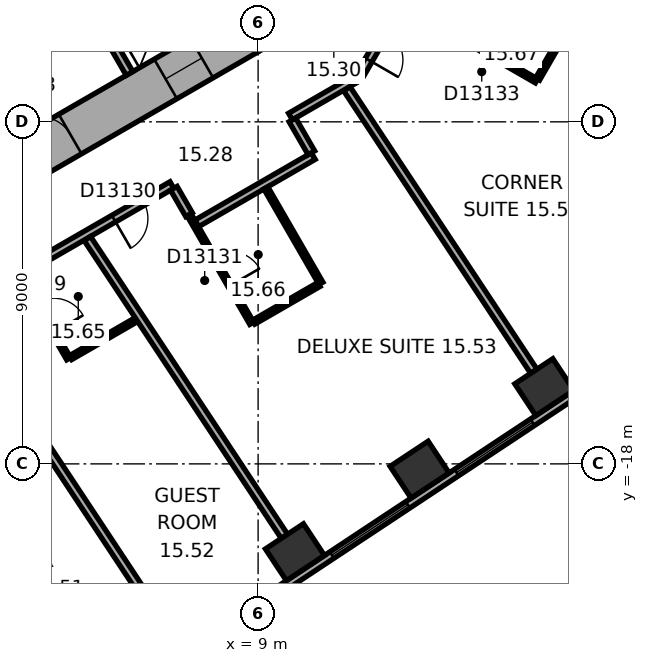
"""IFC4 building model, lengths in metres.
Left out: names, types, materials, properties, quantities, classifications, styles, units other than length and angle.
Written with IfcOpenShell. Run it as: python <this file> out.ifc"""

import sys

from ifc_helpers import new_model, si_unit, direction, frame, frame_2d, origin, origin_2d, place, context, subcontext, project, spatial, rectangle, extrude, element, fill, save


model = new_model("IFC4")
c1 = context("Model", 3, precision=1e-05, world=origin(), true_north=direction((0.0, 1.0)))
c2 = subcontext(c1, "Body", "Model", "MODEL_VIEW")
j1 = project(units=[si_unit("LENGTHUNIT", "METRE"), si_unit("PLANEANGLEUNIT", "RADIAN")], contexts=[c1])
p1 = place(None, origin())
s1 = spatial("IfcSite", under=j1, at=p1, CompositionType="ELEMENT")
p2 = place(p1, origin())
s2 = spatial("IfcBuilding", under=s1, at=p2, CompositionType="ELEMENT")
p3 = place(p2, frame((0.0, 0.0, 70.4)))
s3 = spatial("IfcBuildingStorey", under=s2, at=p3, CompositionType="ELEMENT", Elevation=70.4)
for number, where, z_axis, x_axis in (
    (1, (9.969, -20.324, 0.0), (0.0, 0.0, 1.0), (0.834, 0.552, 0.0)),
    (2, (13.25, -18.152, 0.0), (0.0, 0.0, 1.0), (0.834, 0.552, 0.0)),
    (3, (16.531, -15.981, 0.0), (0.0, 0.0, 1.0), (0.834, 0.552, 0.0)),
):
    element("IfcColumn", number, at=place(p3, frame(where, z_axis=z_axis, x_axis=x_axis)), inside=s3, PredefinedType="COLUMN", context=c2, shape_type="SweptSolid", body=[
        extrude(rectangle(XDim=1.2, YDim=1.0, at=origin_2d()), origin(), (0.0, 0.0, 1.0), 3.3),
    ])
p4 = place(p3, frame((-0.3, -11.836, 0.0), z_axis=(0.0, 0.0, 1.0), x_axis=(0.866021384402, 0.500006961711, 0.0)))
e4 = element("IfcWall", 4, at=p4, inside=s3, PredefinedType="SHEAR", context=c2, shape_type="SweptSolid", body=[
    extrude(rectangle(XDim=12.355, YDim=1.2, at=frame_2d((6.178, 0.0))), origin(), (0.0, 0.0, 1.0), 3.3),
])
p5 = place(p4, frame((4.128, 0.0, 0.0)))
e5 = element("IfcOpeningElement", 5, at=p5, cuts=e4, PredefinedType="OPENING", context=c2, shape_type="SweptSolid", body=[
    extrude(rectangle(XDim=0.9, YDim=2.1, at=frame_2d((0.45, 1.05))), frame((0.0, 0.61, 0.0), z_axis=(0.0, -1.0, 0.0), x_axis=(1.0, 0.0, 0.0)), (0.0, 0.0, 1.0), 1.22),
])
p6 = place(p4, frame((7.928, 0.0, 0.0)))
e6 = element("IfcOpeningElement", 6, at=p6, cuts=e4, PredefinedType="OPENING", context=c2, shape_type="SweptSolid", body=[
    extrude(rectangle(XDim=1.1, YDim=2.1, at=frame_2d((0.55, 1.05))), frame((0.0, 0.61, 0.0), z_axis=(0.0, -1.0, 0.0), x_axis=(1.0, 0.0, 0.0)), (0.0, 0.0, 1.0), 1.22),
])
p7 = place(p3, frame((3.083, -25.601, 0.0), z_axis=(0.0, 0.0, 1.0), x_axis=(0.833884295743, 0.551939291329, 0.0)))
e7 = element("IfcWall", 7, at=p7, inside=s3, PredefinedType="STANDARD", context=c2, shape_type="SweptSolid", body=[
    extrude(rectangle(XDim=21.246, YDim=0.2, at=frame_2d((10.623, 0.0))), origin(), (0.0, 0.0, 1.0), 3.3),
])
p8 = place(p7, frame((1.553, 0.0, 0.8)))
e8 = element("IfcOpeningElement", 8, at=p8, cuts=e7, PredefinedType="OPENING", context=c2, shape_type="SweptSolid", body=[
    extrude(rectangle(XDim=2.4, YDim=1.7, at=frame_2d((1.2, 0.85))), frame((0.0, 0.11, 0.0), z_axis=(0.0, -1.0, 0.0), x_axis=(1.0, 0.0, 0.0)), (0.0, 0.0, 1.0), 0.22),
])
p9 = place(p7, frame((5.488, 0.0, 0.8)))
e9 = element("IfcOpeningElement", 9, at=p9, cuts=e7, PredefinedType="OPENING", context=c2, shape_type="SweptSolid", body=[
    extrude(rectangle(XDim=2.4, YDim=1.7, at=frame_2d((1.2, 0.85))), frame((0.0, 0.11, 0.0), z_axis=(0.0, -1.0, 0.0), x_axis=(1.0, 0.0, 0.0)), (0.0, 0.0, 1.0), 0.22),
])
p10 = place(p7, frame((9.422, 0.0, 0.8)))
e10 = element("IfcOpeningElement", 10, at=p10, cuts=e7, PredefinedType="OPENING", context=c2, shape_type="SweptSolid", body=[
    extrude(rectangle(XDim=2.4, YDim=1.7, at=frame_2d((1.2, 0.85))), frame((0.0, 0.11, 0.0), z_axis=(0.0, -1.0, 0.0), x_axis=(1.0, 0.0, 0.0)), (0.0, 0.0, 1.0), 0.22),
])
p11 = place(p7, frame((13.357, 0.0, 0.8)))
e11 = element("IfcOpeningElement", 11, at=p11, cuts=e7, PredefinedType="OPENING", context=c2, shape_type="SweptSolid", body=[
    extrude(rectangle(XDim=2.4, YDim=1.7, at=frame_2d((1.2, 0.85))), frame((0.0, 0.11, 0.0), z_axis=(0.0, -1.0, 0.0), x_axis=(1.0, 0.0, 0.0)), (0.0, 0.0, 1.0), 0.22),
])
p12 = place(p7, frame((17.291, 0.0, 0.8)))
e12 = element("IfcOpeningElement", 12, at=p12, cuts=e7, PredefinedType="OPENING", context=c2, shape_type="SweptSolid", body=[
    extrude(rectangle(XDim=2.4, YDim=1.7, at=frame_2d((1.2, 0.85))), frame((0.0, 0.11, 0.0), z_axis=(0.0, -1.0, 0.0), x_axis=(1.0, 0.0, 0.0)), (0.0, 0.0, 1.0), 0.22),
])
p13 = place(p3, frame((-0.024, -8.559, 0.0), z_axis=(0.0, 0.0, 1.0), x_axis=(0.866026010844, 0.49999894854, 0.0)))
e13 = element("IfcWall", 13, at=p13, inside=s3, PredefinedType="PARTITIONING", context=c2, shape_type="SweptSolid", body=[
    extrude(rectangle(XDim=8.0, YDim=0.2, at=frame_2d((4.0, 0.0))), origin(), (0.0, 0.0, 1.0), 3.05),
])
p14 = place(p3, frame((4.516, -5.822, 0.0), z_axis=(0.0, 0.0, 1.0), x_axis=(0.499946605688, -0.86605622881, 0.0)))
e14 = element("IfcWall", 14, at=p14, inside=s3, PredefinedType="PARTITIONING", context=c2, shape_type="SweptSolid", body=[
    extrude(rectangle(XDim=2.2, YDim=0.2, at=frame_2d((1.1, 0.0))), origin(), (0.0, 0.0, 1.0), 3.05),
])
p15 = place(p3, frame((0.847, -7.767, 0.0), z_axis=(0.0, 0.0, 1.0), x_axis=(0.866027801685, 0.499995846692, 0.0)))
e15 = element("IfcWall", 15, at=p15, inside=s3, PredefinedType="SHEAR", context=c2, shape_type="SweptSolid", body=[
    extrude(rectangle(XDim=7.06, YDim=0.3, at=frame_2d((3.53, 0.0))), origin(), (0.0, 0.0, 1.0), 3.05),
])
p16 = place(p3, frame((1.033, -13.953, 0.0), z_axis=(0.0, 0.0, 1.0), x_axis=(0.866017531406, 0.500013635111, 0.0)))
e16 = element("IfcWall", 16, at=p16, inside=s3, PredefinedType="PARTITIONING", context=c2, shape_type="SweptSolid", body=[
    extrude(rectangle(XDim=6.58, YDim=0.2, at=frame_2d((3.29, 0.0))), origin(), (0.0, 0.0, 1.0), 3.05),
])
p17 = place(p16, frame((0.496, 0.0, 0.0)))
e17 = element("IfcOpeningElement", 17, at=p17, cuts=e16, PredefinedType="OPENING", context=c2, shape_type="SweptSolid", body=[
    extrude(rectangle(XDim=0.9, YDim=2.1, at=frame_2d((0.45, 1.05))), frame((0.0, 0.11, 0.0), z_axis=(0.0, -1.0, 0.0), x_axis=(1.0, 0.0, 0.0)), (0.0, 0.0, 1.0), 0.22),
])
p18 = place(p16, frame((4.811, 0.0, 0.0)))
e18 = element("IfcOpeningElement", 18, at=p18, cuts=e16, PredefinedType="OPENING", context=c2, shape_type="SweptSolid", body=[
    extrude(rectangle(XDim=0.9, YDim=2.1, at=frame_2d((0.45, 1.05))), frame((0.0, 0.11, 0.0), z_axis=(0.0, -1.0, 0.0), x_axis=(1.0, 0.0, 0.0)), (0.0, 0.0, 1.0), 0.22),
])
p19 = place(p3, frame((4.015, -15.233, 0.0), z_axis=(0.0, 0.0, 1.0), x_axis=(-0.499961950354, 0.866047370643, 0.0)))
e19 = element("IfcWall", 19, at=p19, inside=s3, PredefinedType="PARTITIONING", context=c2, shape_type="SweptSolid", body=[
    extrude(rectangle(XDim=2.5, YDim=0.12, at=frame_2d((1.25, 0.0))), origin(), (0.0, 0.0, 1.0), 3.05),
])
p20 = place(p19, frame((0.8, 0.0, 0.0)))
e20 = element("IfcOpeningElement", 20, at=p20, cuts=e19, PredefinedType="OPENING", context=c2, shape_type="SweptSolid", body=[
    extrude(rectangle(XDim=0.9, YDim=2.1, at=frame_2d((0.45, 1.05))), frame((0.0, 0.07, 0.0), z_axis=(0.0, -1.0, 0.0), x_axis=(1.0, 0.0, 0.0)), (0.0, 0.0, 1.0), 0.14),
])
p21 = place(p3, frame((5.798, -14.204, 0.0), z_axis=(0.0, 0.0, 1.0), x_axis=(-0.865972029493, -0.500092435591, 0.0)))
e21 = element("IfcWall", 21, at=p21, inside=s3, PredefinedType="PARTITIONING", context=c2, shape_type="SweptSolid", body=[
    extrude(rectangle(XDim=1.999, YDim=0.12, at=frame_2d((1.0, 0.0))), origin(), (0.0, 0.0, 1.0), 3.05),
])
p22 = place(p3, frame((6.412, -22.079, 0.0), z_axis=(0.0, 0.0, 1.0), x_axis=(-0.551919507115, 0.83389739037, 0.0)))
e22 = element("IfcWall", 22, at=p22, inside=s3, PredefinedType="PARTITIONING", context=c2, shape_type="SweptSolid", body=[
    extrude(rectangle(XDim=9.635, YDim=0.2, at=frame_2d((4.817, 0.0))), origin(), (0.0, 0.0, 1.0), 3.05),
])
p23 = place(p3, frame((6.782, -10.749, 0.0), z_axis=(0.0, 0.0, 1.0), x_axis=(0.500170954823, -0.865926680471, 0.0)))
e23 = element("IfcWall", 23, at=p23, inside=s3, PredefinedType="PARTITIONING", context=c2, shape_type="SweptSolid", body=[
    extrude(rectangle(XDim=0.801, YDim=0.2, at=frame_2d((0.4, 0.0))), origin(), (0.0, 0.0, 1.0), 3.05),
])
p24 = place(p3, frame((7.385, -11.673, 0.0), z_axis=(0.0, 0.0, 1.0), x_axis=(0.866037524642, 0.499979005472, 0.0)))
e24 = element("IfcWall", 24, at=p24, inside=s3, PredefinedType="PARTITIONING", context=c2, shape_type="SweptSolid", body=[
    extrude(rectangle(XDim=3.542, YDim=0.2, at=frame_2d((1.771, 0.0))), origin(), (0.0, 0.0, 1.0), 3.05),
])
p25 = place(p3, frame((8.833, -14.301, 0.0), z_axis=(0.0, 0.0, 1.0), x_axis=(-0.499936836718, 0.866061868051, 0.0)))
e25 = element("IfcWall", 25, at=p25, inside=s3, PredefinedType="PARTITIONING", context=c2, shape_type="SweptSolid", body=[
    extrude(rectangle(XDim=3.188, YDim=0.12, at=frame_2d((1.594, 0.0))), origin(), (0.0, 0.0, 1.0), 3.05),
])
p26 = place(p25, frame((1.144, 0.0, 0.0)))
e26 = element("IfcOpeningElement", 26, at=p26, cuts=e25, PredefinedType="OPENING", context=c2, shape_type="SweptSolid", body=[
    extrude(rectangle(XDim=0.9, YDim=2.1, at=frame_2d((0.45, 1.05))), frame((0.0, 0.07, 0.0), z_axis=(0.0, -1.0, 0.0), x_axis=(1.0, 0.0, 0.0)), (0.0, 0.0, 1.0), 0.14),
])
p27 = place(p3, frame((9.203, -10.738, 0.0), z_axis=(0.0, 0.0, 1.0), x_axis=(0.50005036918, -0.865996321171, 0.0)))
e27 = element("IfcWall", 27, at=p27, inside=s3, PredefinedType="PARTITIONING", context=c2, shape_type="SweptSolid", body=[
    extrude(rectangle(XDim=2.9, YDim=0.12, at=frame_2d((1.45, 0.0))), origin(), (0.0, 0.0, 1.0), 3.05),
])
p28 = place(p3, frame((9.693, -19.907, 0.0), z_axis=(0.0, 0.0, 1.0), x_axis=(-0.551938394837, 0.833884889121, 0.0)))
e28 = element("IfcWall", 28, at=p28, inside=s3, PredefinedType="PARTITIONING", context=c2, shape_type="SweptSolid", body=[
    extrude(rectangle(XDim=9.394, YDim=0.2, at=frame_2d((4.697, 0.0))), origin(), (0.0, 0.0, 1.0), 2.6),
])
p29 = place(p3, frame((9.852, -8.861, 0.0), z_axis=(0.0, 0.0, 1.0), x_axis=(0.866013291437, 0.500020978615, 0.0)))
e29 = element("IfcWall", 29, at=p29, inside=s3, PredefinedType="PARTITIONING", context=c2, shape_type="SweptSolid", body=[
    extrude(rectangle(XDim=2.077, YDim=0.2, at=frame_2d((1.038, 0.0))), origin(), (0.0, 0.0, 1.0), 3.05),
])
p30 = place(p3, frame((10.402, -9.815, 0.0), z_axis=(0.0, 0.0, 1.0), x_axis=(-0.499968756647, 0.866043441391, 0.0)))
e30 = element("IfcWall", 30, at=p30, inside=s3, PredefinedType="PARTITIONING", context=c2, shape_type="SweptSolid", body=[
    extrude(rectangle(XDim=1.001, YDim=0.2, at=frame_2d((0.5, 0.0))), origin(), (0.0, 0.0, 1.0), 3.05),
])
p31 = place(p3, frame((10.601, -13.28, 0.0), z_axis=(0.0, 0.0, 1.0), x_axis=(-0.866044057189, -0.499967689963, 0.0)))
e31 = element("IfcWall", 31, at=p31, inside=s3, PredefinedType="PARTITIONING", context=c2, shape_type="SweptSolid", body=[
    extrude(rectangle(XDim=1.982, YDim=0.12, at=frame_2d((0.991, 0.0))), origin(), (0.0, 0.0, 1.0), 3.05),
])
p32 = place(p3, frame((11.67, -7.788, 0.0), z_axis=(0.0, 0.0, 1.0), x_axis=(0.500063286585, 0.865988862174, 0.0)))
e32 = element("IfcWall", 32, at=p32, inside=s3, PredefinedType="PARTITIONING", context=c2, shape_type="SweptSolid", body=[
    extrude(rectangle(XDim=1.86, YDim=0.2, at=frame_2d((0.93, 0.0))), origin(), (0.0, 0.0, 1.0), 3.05),
])
p33 = place(p32, frame((0.48, 0.0, 0.0)))
e33 = element("IfcOpeningElement", 33, at=p33, cuts=e32, PredefinedType="OPENING", context=c2, shape_type="SweptSolid", body=[
    extrude(rectangle(XDim=0.9, YDim=2.1, at=frame_2d((0.45, 1.05))), frame((0.0, 0.11, 0.0), z_axis=(0.0, -1.0, 0.0), x_axis=(1.0, 0.0, 0.0)), (0.0, 0.0, 1.0), 0.22),
])
p34 = place(p3, frame((16.255, -15.564, 0.0), z_axis=(0.0, 0.0, 1.0), x_axis=(-0.55192208744, 0.833895682562, 0.0)))
e34 = element("IfcWall", 34, at=p34, inside=s3, PredefinedType="PARTITIONING", context=c2, shape_type="SweptSolid", body=[
    extrude(rectangle(XDim=8.913, YDim=0.2, at=frame_2d((4.457, 0.0))), origin(), (0.0, 0.0, 1.0), 2.6),
])
p35 = place(p3, frame((16.326, -7.925, 0.0), z_axis=(0.0, 0.0, 1.0), x_axis=(-0.865997131366, 0.500048966069, 0.0)))
e35 = element("IfcWall", 35, at=p35, inside=s3, PredefinedType="PARTITIONING", context=c2, shape_type="SweptSolid", body=[
    extrude(rectangle(XDim=2.74, YDim=0.12, at=frame_2d((1.37, 0.0))), origin(), (0.0, 0.0, 1.0), 3.05),
])
p36 = place(p35, frame((0.92, 0.0, 0.0)))
e36 = element("IfcOpeningElement", 36, at=p36, cuts=e35, PredefinedType="OPENING", context=c2, shape_type="SweptSolid", body=[
    extrude(rectangle(XDim=0.9, YDim=2.1, at=frame_2d((0.45, 1.05))), frame((0.0, 0.07, 0.0), z_axis=(0.0, -1.0, 0.0), x_axis=(1.0, 0.0, 0.0)), (0.0, 0.0, 1.0), 0.14),
])
p37 = place(p3, frame((17.396, -6.071, 0.0), z_axis=(0.0, 0.0, 1.0), x_axis=(-0.500027264788, -0.866009661879, 0.0)))
e37 = element("IfcWall", 37, at=p37, inside=s3, PredefinedType="PARTITIONING", context=c2, shape_type="SweptSolid", body=[
    extrude(rectangle(XDim=2.08, YDim=0.12, at=frame_2d((1.04, 0.0))), origin(), (0.0, 0.0, 1.0), 3.05),
])
p38 = place(p10, origin())
e38 = element("IfcWindow", 38, at=p38, inside=s3, PartitioningType="SINGLE_PANEL", PredefinedType="WINDOW", context=c2, shape_type="SweptSolid", body=[
    extrude(rectangle(XDim=2.4, YDim=1.7, at=frame_2d((1.2, 0.85))), frame((0.0, 0.03, 0.0), z_axis=(0.0, -1.0, 0.0), x_axis=(1.0, 0.0, 0.0)), (0.0, 0.0, 1.0), 0.06),
])
fill(e10, e38)
p39 = place(p11, origin())
e39 = element("IfcWindow", 39, at=p39, inside=s3, PartitioningType="SINGLE_PANEL", PredefinedType="WINDOW", context=c2, shape_type="SweptSolid", body=[
    extrude(rectangle(XDim=2.4, YDim=1.7, at=frame_2d((1.2, 0.85))), frame((0.0, 0.03, 0.0), z_axis=(0.0, -1.0, 0.0), x_axis=(1.0, 0.0, 0.0)), (0.0, 0.0, 1.0), 0.06),
])
fill(e11, e39)
p40 = place(p5, origin())
e40 = element("IfcDoor", 40, at=p40, inside=s3, OperationType="SINGLE_SWING_LEFT", PredefinedType="DOOR", context=c2, shape_type="SweptSolid", body=[
    extrude(rectangle(XDim=0.9, YDim=2.1, at=frame_2d((0.45, 1.05))), frame((0.0, 0.025, 0.0), z_axis=(0.0, -1.0, 0.0), x_axis=(1.0, 0.0, 0.0)), (0.0, 0.0, 1.0), 0.05),
])
fill(e5, e40)
p41 = place(p6, origin())
e41 = element("IfcDoor", 41, at=p41, inside=s3, OperationType="DOUBLE_DOOR_SLIDING", PredefinedType="DOOR", context=c2, shape_type="SweptSolid", body=[
    extrude(rectangle(XDim=1.1, YDim=2.1, at=frame_2d((0.55, 1.05))), frame((0.0, 0.025, 0.0), z_axis=(0.0, -1.0, 0.0), x_axis=(1.0, 0.0, 0.0)), (0.0, 0.0, 1.0), 0.05),
])
fill(e6, e41)
p42 = place(p20, origin())
e42 = element("IfcDoor", 42, at=p42, inside=s3, OperationType="SINGLE_SWING_LEFT", PredefinedType="DOOR", context=c2, shape_type="SweptSolid", body=[
    extrude(rectangle(XDim=0.9, YDim=2.1, at=frame_2d((0.45, 1.05))), frame((0.0, 0.025, 0.0), z_axis=(0.0, -1.0, 0.0), x_axis=(1.0, 0.0, 0.0)), (0.0, 0.0, 1.0), 0.05),
])
fill(e20, e42)
p43 = place(p18, origin())
e43 = element("IfcDoor", 43, at=p43, inside=s3, OperationType="SINGLE_SWING_LEFT", PredefinedType="DOOR", context=c2, shape_type="SweptSolid", body=[
    extrude(rectangle(XDim=0.9, YDim=2.1, at=frame_2d((0.45, 1.05))), frame((0.0, 0.025, 0.0), z_axis=(0.0, -1.0, 0.0), x_axis=(1.0, 0.0, 0.0)), (0.0, 0.0, 1.0), 0.05),
])
fill(e18, e43)
p44 = place(p26, origin())
e44 = element("IfcDoor", 44, at=p44, inside=s3, OperationType="SINGLE_SWING_LEFT", PredefinedType="DOOR", context=c2, shape_type="SweptSolid", body=[
    extrude(rectangle(XDim=0.9, YDim=2.1, at=frame_2d((0.45, 1.05))), frame((0.0, 0.025, 0.0), z_axis=(0.0, -1.0, 0.0), x_axis=(1.0, 0.0, 0.0)), (0.0, 0.0, 1.0), 0.05),
])
fill(e26, e44)
p45 = place(p33, origin())
e45 = element("IfcDoor", 45, at=p45, inside=s3, OperationType="SINGLE_SWING_LEFT", PredefinedType="DOOR", context=c2, shape_type="SweptSolid", body=[
    extrude(rectangle(XDim=0.9, YDim=2.1, at=frame_2d((0.45, 1.05))), frame((0.0, 0.025, 0.0), z_axis=(0.0, -1.0, 0.0), x_axis=(1.0, 0.0, 0.0)), (0.0, 0.0, 1.0), 0.05),
])
fill(e33, e45)
p46 = place(p36, origin())
e46 = element("IfcDoor", 46, at=p46, inside=s3, OperationType="SINGLE_SWING_LEFT", PredefinedType="DOOR", context=c2, shape_type="SweptSolid", body=[
    extrude(rectangle(XDim=0.9, YDim=2.1, at=frame_2d((0.45, 1.05))), frame((0.0, 0.025, 0.0), z_axis=(0.0, -1.0, 0.0), x_axis=(1.0, 0.0, 0.0)), (0.0, 0.0, 1.0), 0.05),
])
fill(e36, e46)
save(model, sys.argv[1])
